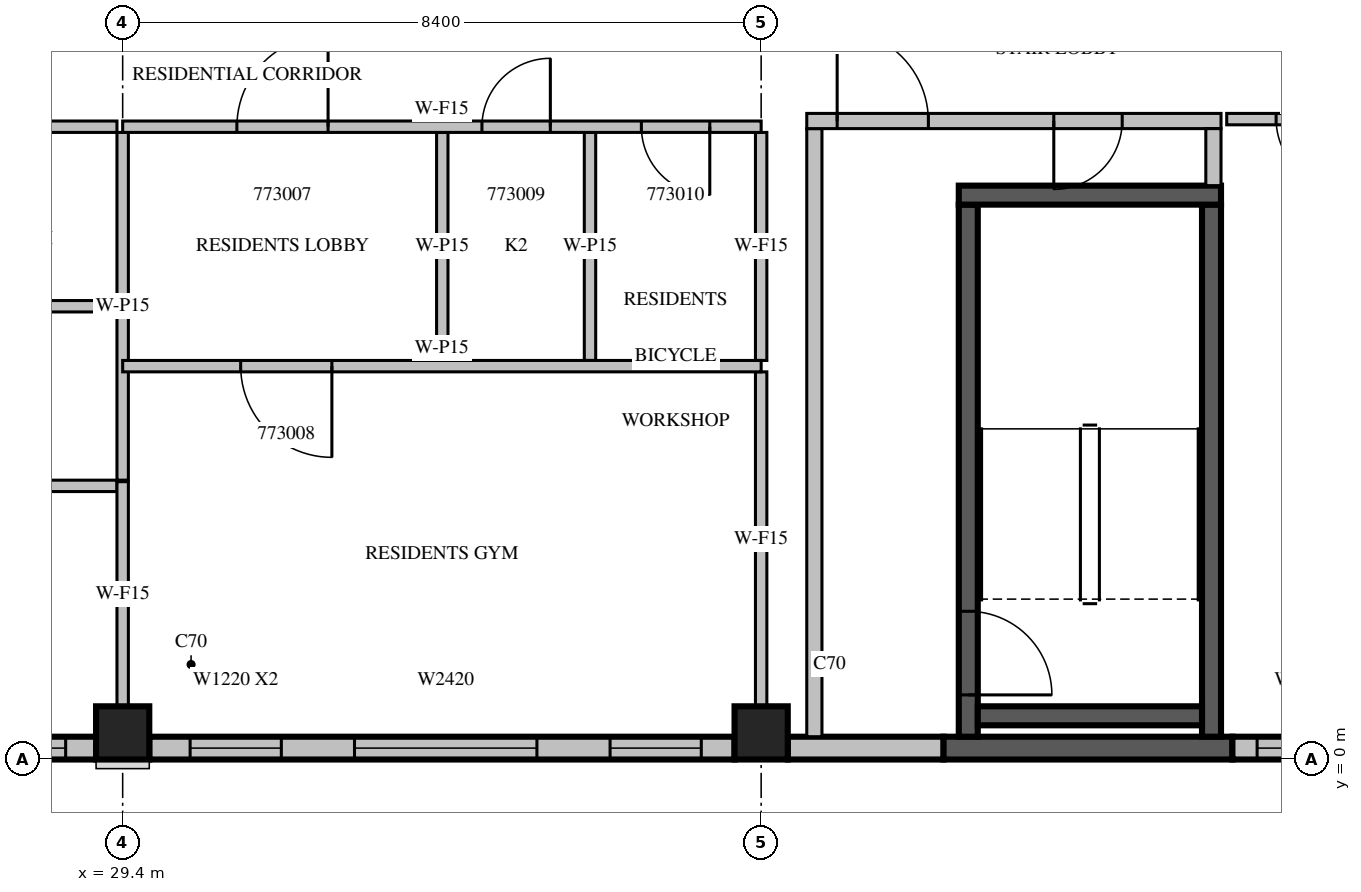
"""IFC4 building model, lengths in metres.
Left out: names, types, materials, properties, quantities, classifications, styles, units other than length and angle.
Written with IfcOpenShell. Run it as: python <this file> out.ifc"""

import sys

from ifc_helpers import new_model, si_unit, direction, frame, frame_2d, origin, origin_2d, place, context, subcontext, project, spatial, rectangle, extrude, source, transform, mapped, element, fill, save


model = new_model("IFC4")
c1 = context("Model", 3, precision=1e-05, world=origin(), true_north=direction((0.0, 1.0)))
c2 = subcontext(c1, "Body", "Model", "MODEL_VIEW")
j1 = project(units=[si_unit("LENGTHUNIT", "METRE"), si_unit("PLANEANGLEUNIT", "RADIAN")], contexts=[c1])
p1 = place(None, origin())
s1 = spatial("IfcSite", under=j1, at=p1, CompositionType="ELEMENT")
p2 = place(p1, origin())
s2 = spatial("IfcBuilding", under=s1, at=p2, CompositionType="ELEMENT")
p3 = place(p2, frame((0.0, 0.0, 316.0)))
s3 = spatial("IfcBuildingStorey", under=s2, at=p3, CompositionType="ELEMENT", Elevation=316.0)
m1 = source(origin(), c2, "Body", "SweptSolid", [
    extrude(rectangle(XDim=0.7, YDim=0.7, at=origin_2d()), origin(), (0.0, 0.0, 1.0), 3.5),
])
for number, where, z_axis, x_axis in (
    (1, (29.4, 0.35, 0.0), (0.0, 0.0, 1.0), (1.0, 0.0, 0.0)),
    (2, (37.8, 0.35, 0.0), (0.0, 0.0, 1.0), (1.0, 0.0, 0.0)),
):
    element("IfcColumn", number, at=place(p3, frame(where, z_axis=z_axis, x_axis=x_axis)), inside=s3, PredefinedType="COLUMN", context=c2, shape_type="MappedRepresentation", body=[
        mapped(m1, transform((0.0, 0.0, 0.0), scale=1.0)),
    ])
m2 = source(origin(), c2, "Body", "SweptSolid", [
    extrude(rectangle(XDim=7.7, YDim=0.3, at=frame_2d((3.85, 0.0))), origin(), (0.0, 0.0, 1.0), 3.1),
])
p4 = place(p3, frame((21.35, 0.15, 0.0), z_axis=(0.0, 0.0, 1.0), x_axis=(1.0, 0.0, 0.0)))
e3 = element("IfcWall", 3, at=p4, inside=s3, PredefinedType="STANDARD", context=c2, shape_type="MappedRepresentation", body=[
    mapped(m2, transform((0.0, 0.0, 0.0), scale=1.0)),
])
m3 = source(origin(), c2, "Body", "SweptSolid", [
    extrude(rectangle(XDim=2.4, YDim=2.0, at=frame_2d((1.2, 1.0))), frame((0.0, 0.16, 0.0), z_axis=(0.0, -1.0, 0.0), x_axis=(1.0, 0.0, 0.0)), (0.0, 0.0, 1.0), 0.32),
])
p5 = place(p4, frame((1.0, 0.0, 0.6)))
e4 = element("IfcOpeningElement", 4, at=p5, cuts=e3, PredefinedType="OPENING", context=c2, shape_type="MappedRepresentation", body=[
    mapped(m3, transform((0.0, 0.0, 0.0), scale=1.0)),
])
p6 = place(p4, frame((4.9, 0.0, 0.6)))
e5 = element("IfcOpeningElement", 5, at=p6, cuts=e3, PredefinedType="OPENING", context=c2, shape_type="MappedRepresentation", body=[
    mapped(m3, transform((0.0, 0.0, 0.0), scale=1.0)),
])
p7 = place(p3, frame((29.75, 0.15, 0.0), z_axis=(0.0, 0.0, 1.0), x_axis=(1.0, 0.0, 0.0)))
e6 = element("IfcWall", 6, at=p7, inside=s3, PredefinedType="STANDARD", context=c2, shape_type="MappedRepresentation", body=[
    mapped(m2, transform((0.0, 0.0, 0.0), scale=1.0)),
])
m4 = source(origin(), c2, "Body", "SweptSolid", [
    extrude(rectangle(XDim=1.2, YDim=2.0, at=frame_2d((0.6, 1.0))), frame((0.0, 0.16, 0.0), z_axis=(0.0, -1.0, 0.0), x_axis=(1.0, 0.0, 0.0)), (0.0, 0.0, 1.0), 0.32),
])
p8 = place(p7, frame((0.537, 0.0, 0.6)))
e7 = element("IfcOpeningElement", 7, at=p8, cuts=e6, PredefinedType="OPENING", context=c2, shape_type="MappedRepresentation", body=[
    mapped(m4, transform((0.0, 0.0, 0.0), scale=1.0)),
])
p9 = place(p7, frame((6.062, 0.0, 0.6)))
e8 = element("IfcOpeningElement", 8, at=p9, cuts=e6, PredefinedType="OPENING", context=c2, shape_type="MappedRepresentation", body=[
    mapped(m4, transform((0.0, 0.0, 0.0), scale=1.0)),
])
p10 = place(p7, frame((2.7, 0.0, 0.6)))
e9 = element("IfcOpeningElement", 9, at=p10, cuts=e6, PredefinedType="OPENING", context=c2, shape_type="MappedRepresentation", body=[
    mapped(m3, transform((0.0, 0.0, 0.0), scale=1.0)),
])
m5 = source(origin(), c2, "Body", "SweptSolid", [
    extrude(rectangle(XDim=2.05, YDim=0.3, at=frame_2d((1.025, 0.0))), origin(), (0.0, 0.0, 1.0), 3.1),
])
p11 = place(p3, frame((38.15, 0.15, 0.0), z_axis=(0.0, 0.0, 1.0), x_axis=(1.0, 0.0, 0.0)))
e10 = element("IfcWall", 10, at=p11, inside=s3, PredefinedType="STANDARD", context=c2, shape_type="MappedRepresentation", body=[
    mapped(m5, transform((0.0, 0.0, 0.0), scale=1.0)),
])
m6 = source(origin(), c2, "Body", "SweptSolid", [
    extrude(rectangle(XDim=3.8, YDim=0.3, at=frame_2d((1.9, 0.0))), origin(), (0.0, 0.0, 1.0), 3.1),
])
p12 = place(p3, frame((40.2, 0.15, 0.0), z_axis=(0.0, 0.0, 1.0), x_axis=(1.0, 0.0, 0.0)))
e11 = element("IfcWall", 11, at=p12, inside=s3, PredefinedType="SOLIDWALL", context=c2, shape_type="MappedRepresentation", body=[
    mapped(m6, transform((0.0, 0.0, 0.0), scale=1.0)),
])
m7 = source(origin(), c2, "Body", "SweptSolid", [
    extrude(rectangle(XDim=1.85, YDim=0.3, at=frame_2d((0.925, 0.0))), origin(), (0.0, 0.0, 1.0), 3.1),
])
p13 = place(p3, frame((44.0, 0.15, 0.0), z_axis=(0.0, 0.0, 1.0), x_axis=(1.0, 0.0, 0.0)))
e12 = element("IfcWall", 12, at=p13, inside=s3, PredefinedType="STANDARD", context=c2, shape_type="MappedRepresentation", body=[
    mapped(m7, transform((0.0, 0.0, 0.0), scale=1.0)),
])
p14 = place(p13, frame((0.325, 0.0, 0.6)))
e13 = element("IfcOpeningElement", 13, at=p14, cuts=e12, PredefinedType="OPENING", context=c2, shape_type="MappedRepresentation", body=[
    mapped(m4, transform((0.0, 0.0, 0.0), scale=1.0)),
])
m8 = source(origin(), c2, "Body", "SweptSolid", [
    extrude(rectangle(XDim=7.0, YDim=0.25, at=frame_2d((3.5, 0.0))), origin(), (0.0, 0.0, 1.0), 3.1),
])
p15 = place(p3, frame((40.525, 0.3, 0.0), z_axis=(0.0, 0.0, 1.0), x_axis=(0.0, 1.0, 0.0)))
e14 = element("IfcWall", 14, at=p15, inside=s3, PredefinedType="SOLIDWALL", context=c2, shape_type="MappedRepresentation", body=[
    mapped(m8, transform((0.0, 0.0, 0.0), scale=1.0)),
])
m9 = source(origin(), c2, "Body", "SweptSolid", [
    extrude(rectangle(XDim=1.1, YDim=2.1, at=frame_2d((0.55, 1.05))), frame((0.0, 0.135, 0.0), z_axis=(0.0, -1.0, 0.0), x_axis=(1.0, 0.0, 0.0)), (0.0, 0.0, 1.0), 0.27),
])
p16 = place(p15, frame((0.55, 0.0, 0.0)))
e15 = element("IfcOpeningElement", 15, at=p16, cuts=e14, PredefinedType="OPENING", context=c2, shape_type="MappedRepresentation", body=[
    mapped(m9, transform((0.0, 0.0, 0.0), scale=1.0)),
])
p17 = place(p3, frame((43.725, 0.3, 0.0), z_axis=(0.0, 0.0, 1.0), x_axis=(0.0, 1.0, 0.0)))
e16 = element("IfcWall", 16, at=p17, inside=s3, PredefinedType="SOLIDWALL", context=c2, shape_type="MappedRepresentation", body=[
    mapped(m8, transform((0.0, 0.0, 0.0), scale=1.0)),
])
m10 = source(origin(), c2, "Body", "SweptSolid", [
    extrude(rectangle(XDim=3.45, YDim=0.25, at=frame_2d((1.725, 0.0))), origin(), (0.0, 0.0, 1.0), 3.1),
])
p18 = place(p3, frame((40.4, 7.425, 0.0), z_axis=(0.0, 0.0, 1.0), x_axis=(1.0, 0.0, 0.0)))
e17 = element("IfcWall", 17, at=p18, inside=s3, PredefinedType="SOLIDWALL", context=c2, shape_type="MappedRepresentation", body=[
    mapped(m10, transform((0.0, 0.0, 0.0), scale=1.0)),
])
m11 = source(origin(), c2, "Body", "SweptSolid", [
    extrude(rectangle(XDim=2.95, YDim=0.25, at=frame_2d((1.475, 0.0))), origin(), (0.0, 0.0, 1.0), 3.1),
])
p19 = place(p3, frame((40.65, 0.575, 0.0), z_axis=(0.0, 0.0, 1.0), x_axis=(1.0, 0.0, 0.0)))
e18 = element("IfcWall", 18, at=p19, inside=s3, PredefinedType="SOLIDWALL", context=c2, shape_type="MappedRepresentation", body=[
    mapped(m11, transform((0.0, 0.0, 0.0), scale=1.0)),
])
m12 = source(origin(), c2, "Body", "SweptSolid", [
    extrude(rectangle(XDim=8.0, YDim=0.2, at=frame_2d((4.0, 0.0))), origin(), (0.0, 0.0, 1.0), 3.1),
])
p20 = place(p3, frame((38.5, 0.3, 0.0), z_axis=(0.0, 0.0, 1.0), x_axis=(0.0, 1.0, 0.0)))
e19 = element("IfcWall", 19, at=p20, inside=s3, PredefinedType="PARTITIONING", context=c2, shape_type="MappedRepresentation", body=[
    mapped(m12, transform((0.0, 0.0, 0.0), scale=1.0)),
])
m13 = source(origin(), c2, "Body", "SweptSolid", [
    extrude(rectangle(XDim=5.45, YDim=0.2, at=frame_2d((2.725, 0.0))), origin(), (0.0, 0.0, 1.0), 3.1),
])
p21 = place(p3, frame((38.4, 8.4, 0.0), z_axis=(0.0, 0.0, 1.0), x_axis=(1.0, 0.0, 0.0)))
e20 = element("IfcWall", 20, at=p21, inside=s3, PredefinedType="PARTITIONING", context=c2, shape_type="MappedRepresentation", body=[
    mapped(m13, transform((0.0, 0.0, 0.0), scale=1.0)),
])
m14 = source(origin(), c2, "Body", "SweptSolid", [
    extrude(rectangle(XDim=1.2, YDim=2.1, at=frame_2d((0.6, 1.05))), frame((0.0, 0.11, 0.0), z_axis=(0.0, -1.0, 0.0), x_axis=(1.0, 0.0, 0.0)), (0.0, 0.0, 1.0), 0.22),
])
p22 = place(p21, frame((0.4, 0.0, 0.0)))
e21 = element("IfcOpeningElement", 21, at=p22, cuts=e20, PredefinedType="OPENING", context=c2, shape_type="MappedRepresentation", body=[
    mapped(m14, transform((0.0, 0.0, 0.0), scale=1.0)),
])
m15 = source(origin(), c2, "Body", "SweptSolid", [
    extrude(rectangle(XDim=0.9, YDim=2.1, at=frame_2d((0.45, 1.05))), frame((0.0, 0.11, 0.0), z_axis=(0.0, -1.0, 0.0), x_axis=(1.0, 0.0, 0.0)), (0.0, 0.0, 1.0), 0.22),
])
p23 = place(p21, frame((3.25, 0.0, 0.0)))
e22 = element("IfcOpeningElement", 22, at=p23, cuts=e20, PredefinedType="OPENING", context=c2, shape_type="MappedRepresentation", body=[
    mapped(m15, transform((0.0, 0.0, 0.0), scale=1.0)),
])
m16 = source(origin(), c2, "Body", "SweptSolid", [
    extrude(rectangle(XDim=0.75, YDim=0.2, at=frame_2d((0.375, 0.0))), origin(), (0.0, 0.0, 1.0), 3.1),
])
p24 = place(p3, frame((43.75, 7.55, 0.0), z_axis=(0.0, 0.0, 1.0), x_axis=(0.0, 1.0, 0.0)))
e23 = element("IfcWall", 23, at=p24, inside=s3, PredefinedType="PARTITIONING", context=c2, shape_type="MappedRepresentation", body=[
    mapped(m16, transform((0.0, 0.0, 0.0), scale=1.0)),
])
m17 = source(origin(), c2, "Body", "SweptSolid", [
    extrude(rectangle(XDim=4.575, YDim=0.15, at=frame_2d((2.288, 0.0))), origin(), (0.0, 0.0, 1.0), 3.1),
])
p25 = place(p3, frame((29.4, 3.675, 0.0), z_axis=(0.0, 0.0, 1.0), x_axis=(0.0, 1.0, 0.0)))
e24 = element("IfcWall", 24, at=p25, inside=s3, PredefinedType="PARTITIONING", context=c2, shape_type="MappedRepresentation", body=[
    mapped(m17, transform((0.0, 0.0, 0.0), scale=1.0)),
])
p26 = place(p3, frame((29.325, 8.325, 0.0), z_axis=(0.0, 0.0, 1.0), x_axis=(-1.0, 0.0, 0.0)))
e25 = element("IfcWall", 25, at=p26, inside=s3, PredefinedType="PARTITIONING", context=c2, shape_type="SweptSolid", body=[
    extrude(rectangle(XDim=5.05, YDim=0.15, at=frame_2d((2.525, 0.0))), origin(), (0.0, 0.0, 1.0), 3.1),
])
m18 = source(origin(), c2, "Body", "SweptSolid", [
    extrude(rectangle(XDim=1.0, YDim=2.1, at=frame_2d((0.5, 1.05))), frame((0.0, 0.085, 0.0), z_axis=(0.0, -1.0, 0.0), x_axis=(1.0, 0.0, 0.0)), (0.0, 0.0, 1.0), 0.17),
])
p27 = place(p26, frame((2.025, 0.0, 0.0)))
e26 = element("IfcOpeningElement", 26, at=p27, cuts=e25, PredefinedType="OPENING", context=c2, shape_type="MappedRepresentation", body=[
    mapped(m18, transform((0.0, 0.0, 0.0), scale=1.0)),
])
m19 = source(origin(), c2, "Body", "SweptSolid", [
    extrude(rectangle(XDim=5.05, YDim=0.15, at=frame_2d((2.525, 0.0))), origin(), (0.0, 0.0, 1.0), 3.1),
])
p28 = place(p3, frame((29.325, 5.963, 0.0), z_axis=(0.0, 0.0, 1.0), x_axis=(-1.0, 0.0, 0.0)))
e27 = element("IfcWall", 27, at=p28, inside=s3, PredefinedType="PARTITIONING", context=c2, shape_type="MappedRepresentation", body=[
    mapped(m19, transform((0.0, 0.0, 0.0), scale=1.0)),
])
m20 = source(origin(), c2, "Body", "SweptSolid", [
    extrude(rectangle(XDim=7.725, YDim=0.15, at=frame_2d((3.862, 0.0))), origin(), (0.0, 0.0, 1.0), 3.1),
])
p29 = place(p3, frame((21.6, 3.6, 0.0), z_axis=(0.0, 0.0, 1.0), x_axis=(1.0, 0.0, 0.0)))
e28 = element("IfcWall", 28, at=p29, inside=s3, PredefinedType="PARTITIONING", context=c2, shape_type="MappedRepresentation", body=[
    mapped(m20, transform((0.0, 0.0, 0.0), scale=1.0)),
])
m21 = source(origin(), c2, "Body", "SweptSolid", [
    extrude(rectangle(XDim=1.2, YDim=2.1, at=frame_2d((0.6, 1.05))), frame((0.0, 0.085, 0.0), z_axis=(0.0, -1.0, 0.0), x_axis=(1.0, 0.0, 0.0)), (0.0, 0.0, 1.0), 0.17),
])
p30 = place(p29, frame((0.7, 0.0, 0.0)))
e29 = element("IfcOpeningElement", 29, at=p30, cuts=e28, PredefinedType="OPENING", context=c2, shape_type="MappedRepresentation", body=[
    mapped(m21, transform((0.0, 0.0, 0.0), scale=1.0)),
])
m22 = source(origin(), c2, "Body", "SweptSolid", [
    extrude(rectangle(XDim=2.2, YDim=0.15, at=frame_2d((1.1, 0.0))), origin(), (0.0, 0.0, 1.0), 3.1),
])
p31 = place(p3, frame((46.125, 8.425, 0.0), z_axis=(0.0, 0.0, 1.0), x_axis=(-1.0, 0.0, 0.0)))
e30 = element("IfcWall", 30, at=p31, inside=s3, PredefinedType="PARTITIONING", context=c2, shape_type="MappedRepresentation", body=[
    mapped(m22, transform((0.0, 0.0, 0.0), scale=1.0)),
])
m23 = source(origin(), c2, "Body", "SweptSolid", [
    extrude(rectangle(XDim=0.9, YDim=2.1, at=frame_2d((0.45, 1.05))), frame((0.0, 0.085, 0.0), z_axis=(0.0, -1.0, 0.0), x_axis=(1.0, 0.0, 0.0)), (0.0, 0.0, 1.0), 0.17),
])
p32 = place(p31, frame((0.65, 0.0, 0.0)))
e31 = element("IfcOpeningElement", 31, at=p32, cuts=e30, PredefinedType="OPENING", context=c2, shape_type="MappedRepresentation", body=[
    mapped(m23, transform((0.0, 0.0, 0.0), scale=1.0)),
])
p33 = place(p3, frame((33.605, 5.25, 0.0), z_axis=(0.0, 0.0, 1.0), x_axis=(0.0, 1.0, 0.0)))
e32 = element("IfcWall", 32, at=p33, inside=s3, PredefinedType="PARTITIONING", context=c2, shape_type="SweptSolid", body=[
    extrude(rectangle(XDim=3.0, YDim=0.15, at=frame_2d((1.5, 0.0))), origin(), (0.0, 0.0, 1.0), 3.1),
])
m24 = source(origin(), c2, "Body", "SweptSolid", [
    extrude(rectangle(XDim=3.0, YDim=0.15, at=frame_2d((1.5, 0.0))), origin(), (0.0, 0.0, 1.0), 3.1),
])
p34 = place(p3, frame((35.548, 5.25, 0.0), z_axis=(0.0, 0.0, 1.0), x_axis=(0.0, 1.0, 0.0)))
e33 = element("IfcWall", 33, at=p34, inside=s3, PredefinedType="PARTITIONING", context=c2, shape_type="MappedRepresentation", body=[
    mapped(m24, transform((0.0, 0.0, 0.0), scale=1.0)),
])
m25 = source(origin(), c2, "Body", "SweptSolid", [
    extrude(rectangle(XDim=2.956, YDim=0.15, at=frame_2d((1.478, 0.0))), origin(), (0.0, 0.0, 1.0), 3.1),
])
p35 = place(p3, frame((29.4, 0.699, 0.0), z_axis=(0.0, 0.0, 1.0), x_axis=(0.0, 1.0, 0.0)))
e34 = element("IfcWall", 34, at=p35, inside=s3, PredefinedType="PARTITIONING", context=c2, shape_type="MappedRepresentation", body=[
    mapped(m25, transform((0.0, 0.0, 0.0), scale=1.0)),
])
p36 = place(p3, frame((37.8, 0.699, 0.0), z_axis=(0.0, 0.0, 1.0), x_axis=(0.0, 1.0, 0.0)))
e35 = element("IfcWall", 35, at=p36, inside=s3, PredefinedType="PARTITIONING", context=c2, shape_type="SweptSolid", body=[
    extrude(rectangle(XDim=4.401, YDim=0.15, at=frame_2d((2.2, 0.0))), origin(), (0.0, 0.0, 1.0), 3.1),
])
p37 = place(p3, frame((37.8, 5.25, 0.0), z_axis=(0.0, 0.0, 1.0), x_axis=(0.0, 1.0, 0.0)))
e36 = element("IfcWall", 36, at=p37, inside=s3, PredefinedType="PARTITIONING", context=c2, shape_type="MappedRepresentation", body=[
    mapped(m24, transform((0.0, 0.0, 0.0), scale=1.0)),
])
m26 = source(origin(), c2, "Body", "SweptSolid", [
    extrude(rectangle(XDim=8.4, YDim=0.15, at=frame_2d((4.2, 0.0))), origin(), (0.0, 0.0, 1.0), 3.1),
])
p38 = place(p3, frame((37.8, 5.175, 0.0), z_axis=(0.0, 0.0, 1.0), x_axis=(-1.0, 0.0, 0.0)))
e37 = element("IfcWall", 37, at=p38, inside=s3, PredefinedType="PARTITIONING", context=c2, shape_type="MappedRepresentation", body=[
    mapped(m26, transform((0.0, 0.0, 0.0), scale=1.0)),
])
p39 = place(p38, frame((5.648, 0.0, 0.0)))
e38 = element("IfcOpeningElement", 38, at=p39, cuts=e37, PredefinedType="OPENING", context=c2, shape_type="MappedRepresentation", body=[
    mapped(m21, transform((0.0, 0.0, 0.0), scale=1.0)),
])
p40 = place(p3, frame((37.8, 8.325, 0.0), z_axis=(0.0, 0.0, 1.0), x_axis=(-1.0, 0.0, 0.0)))
e39 = element("IfcWall", 39, at=p40, inside=s3, PredefinedType="PARTITIONING", context=c2, shape_type="MappedRepresentation", body=[
    mapped(m26, transform((0.0, 0.0, 0.0), scale=1.0)),
])
p41 = place(p40, frame((5.698, 0.0, 0.0)))
e40 = element("IfcOpeningElement", 40, at=p41, cuts=e39, PredefinedType="OPENING", context=c2, shape_type="MappedRepresentation", body=[
    mapped(m21, transform((0.0, 0.0, 0.0), scale=1.0)),
])
p42 = place(p40, frame((2.773, 0.0, 0.0)))
e41 = element("IfcOpeningElement", 41, at=p42, cuts=e39, PredefinedType="OPENING", context=c2, shape_type="MappedRepresentation", body=[
    mapped(m23, transform((0.0, 0.0, 0.0), scale=1.0)),
])
p43 = place(p40, frame((0.676, 0.0, 0.0)))
e42 = element("IfcOpeningElement", 42, at=p43, cuts=e39, PredefinedType="OPENING", context=c2, shape_type="MappedRepresentation", body=[
    mapped(m23, transform((0.0, 0.0, 0.0), scale=1.0)),
])
m27 = source(origin(), c2, "Body", "SweptSolid", [
    extrude(rectangle(XDim=2.4, YDim=2.0, at=frame_2d((1.2, 1.0))), frame((0.0, 0.03, 0.0), z_axis=(0.0, -1.0, 0.0), x_axis=(1.0, 0.0, 0.0)), (0.0, 0.0, 1.0), 0.06),
])
p44 = place(p6, origin())
e43 = element("IfcWindow", 43, at=p44, inside=s3, PartitioningType="SINGLE_PANEL", PredefinedType="WINDOW", context=c2, shape_type="MappedRepresentation", body=[
    mapped(m27, transform((0.0, 0.0, 0.0), scale=1.0)),
])
fill(e5, e43)
m28 = source(origin(), c2, "Body", "SweptSolid", [
    extrude(rectangle(XDim=1.2, YDim=2.0, at=frame_2d((0.6, 1.0))), frame((0.0, 0.03, 0.0), z_axis=(0.0, -1.0, 0.0), x_axis=(1.0, 0.0, 0.0)), (0.0, 0.0, 1.0), 0.06),
])
p45 = place(p8, origin())
e44 = element("IfcWindow", 44, at=p45, inside=s3, PartitioningType="SINGLE_PANEL", PredefinedType="WINDOW", context=c2, shape_type="MappedRepresentation", body=[
    mapped(m28, transform((0.0, 0.0, 0.0), scale=1.0)),
])
fill(e7, e44)
p46 = place(p9, origin())
e45 = element("IfcWindow", 45, at=p46, inside=s3, PartitioningType="SINGLE_PANEL", PredefinedType="WINDOW", context=c2, shape_type="MappedRepresentation", body=[
    mapped(m28, transform((0.0, 0.0, 0.0), scale=1.0)),
])
fill(e8, e45)
p47 = place(p10, origin())
e46 = element("IfcWindow", 46, at=p47, inside=s3, PartitioningType="SINGLE_PANEL", PredefinedType="WINDOW", context=c2, shape_type="MappedRepresentation", body=[
    mapped(m27, transform((0.0, 0.0, 0.0), scale=1.0)),
])
fill(e9, e46)
p48 = place(p14, origin())
e47 = element("IfcWindow", 47, at=p48, inside=s3, PartitioningType="SINGLE_PANEL", PredefinedType="WINDOW", context=c2, shape_type="MappedRepresentation", body=[
    mapped(m28, transform((0.0, 0.0, 0.0), scale=1.0)),
])
fill(e13, e47)
m29 = source(origin(), c2, "Body", "SweptSolid", [
    extrude(rectangle(XDim=1.1, YDim=2.1, at=frame_2d((0.55, 1.05))), frame((0.0, 0.025, 0.0), z_axis=(0.0, -1.0, 0.0), x_axis=(1.0, 0.0, 0.0)), (0.0, 0.0, 1.0), 0.05),
])
p49 = place(p16, origin())
e48 = element("IfcDoor", 48, at=p49, inside=s3, OperationType="SINGLE_SWING_RIGHT", PredefinedType="DOOR", context=c2, shape_type="MappedRepresentation", body=[
    mapped(m29, transform((0.0, 0.0, 0.0), scale=1.0)),
])
fill(e15, e48)
m30 = source(origin(), c2, "Body", "SweptSolid", [
    extrude(rectangle(XDim=1.2, YDim=2.1, at=frame_2d((0.6, 1.05))), frame((0.0, 0.025, 0.0), z_axis=(0.0, -1.0, 0.0), x_axis=(1.0, 0.0, 0.0)), (0.0, 0.0, 1.0), 0.05),
])
p50 = place(p22, origin())
e49 = element("IfcDoor", 49, at=p50, inside=s3, OperationType="SINGLE_SWING_LEFT", PredefinedType="DOOR", context=c2, shape_type="MappedRepresentation", body=[
    mapped(m30, transform((0.0, 0.0, 0.0), scale=1.0)),
])
fill(e21, e49)
m31 = source(origin(), c2, "Body", "SweptSolid", [
    extrude(rectangle(XDim=0.9, YDim=2.1, at=frame_2d((0.45, 1.05))), frame((0.0, 0.025, 0.0), z_axis=(0.0, -1.0, 0.0), x_axis=(1.0, 0.0, 0.0)), (0.0, 0.0, 1.0), 0.05),
])
p51 = place(p23, origin())
e50 = element("IfcDoor", 50, at=p51, inside=s3, OperationType="SINGLE_SWING_RIGHT", PredefinedType="DOOR", context=c2, shape_type="MappedRepresentation", body=[
    mapped(m31, transform((0.0, 0.0, 0.0), scale=1.0)),
])
fill(e22, e50)
p52 = place(p32, origin())
e51 = element("IfcDoor", 51, at=p52, inside=s3, OperationType="SINGLE_SWING_LEFT", PredefinedType="DOOR", context=c2, shape_type="MappedRepresentation", body=[
    mapped(m31, transform((0.0, 0.0, 0.0), scale=1.0)),
])
fill(e31, e51)
p53 = place(p41, origin())
e52 = element("IfcDoor", 52, at=p53, inside=s3, OperationType="SINGLE_SWING_RIGHT", PredefinedType="DOOR", context=c2, shape_type="MappedRepresentation", body=[
    mapped(m30, transform((0.0, 0.0, 0.0), scale=1.0)),
])
fill(e40, e52)
p54 = place(p39, origin())
e53 = element("IfcDoor", 53, at=p54, inside=s3, OperationType="SINGLE_SWING_LEFT", PredefinedType="DOOR", context=c2, shape_type="MappedRepresentation", body=[
    mapped(m30, transform((0.0, 0.0, 0.0), scale=1.0)),
])
fill(e38, e53)
p55 = place(p42, origin())
e54 = element("IfcDoor", 54, at=p55, inside=s3, OperationType="SINGLE_SWING_RIGHT", PredefinedType="DOOR", context=c2, shape_type="MappedRepresentation", body=[
    mapped(m31, transform((0.0, 0.0, 0.0), scale=1.0)),
])
fill(e41, e54)
p56 = place(p43, origin())
e55 = element("IfcDoor", 55, at=p56, inside=s3, OperationType="SINGLE_SWING_LEFT", PredefinedType="DOOR", context=c2, shape_type="MappedRepresentation", body=[
    mapped(m31, transform((0.0, 0.0, 0.0), scale=1.0)),
])
fill(e42, e55)
save(model, sys.argv[1])
